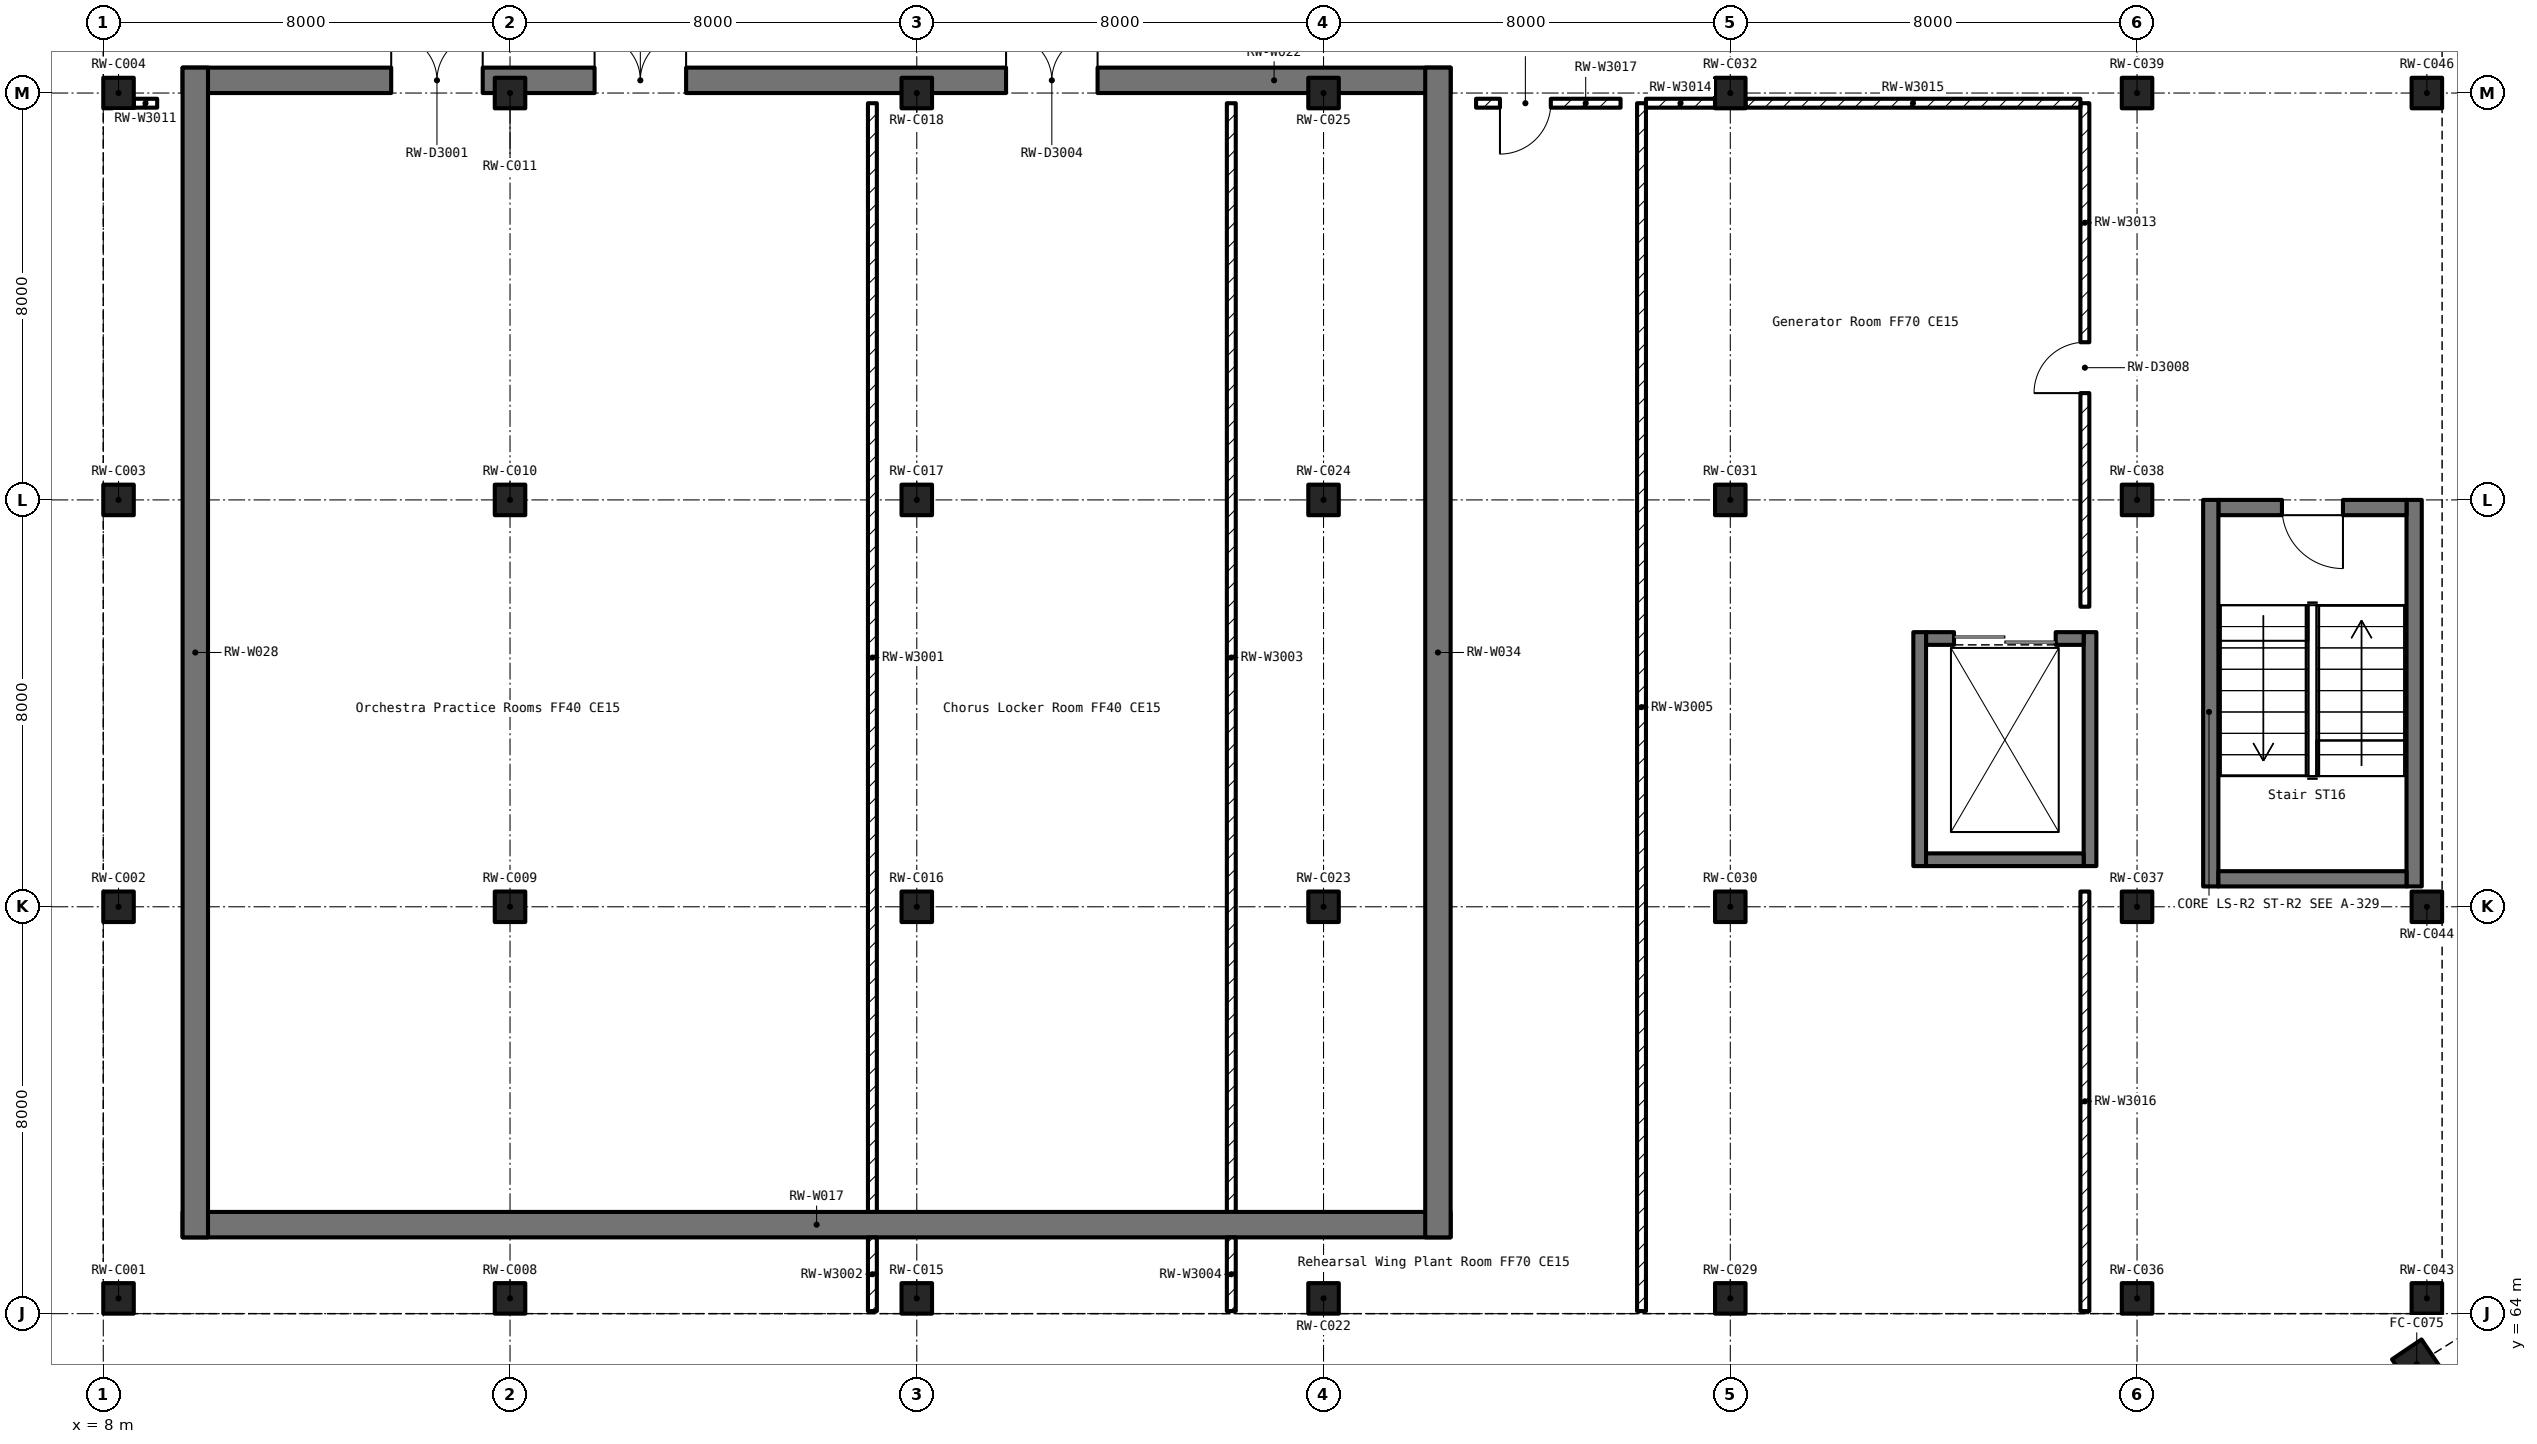
"""IFC4 building model, lengths in metres.
Left out: names, types, materials, properties, quantities, classifications, styles, units other than length and angle.
Written with IfcOpenShell. Run it as: python <this file> out.ifc"""

import sys

from ifc_helpers import new_model, si_unit, direction, frame, frame_2d, origin, origin_2d, place, context, subcontext, project, spatial, rectangle, extrude, element, fill, save


model = new_model("IFC4")
c1 = context("Model", 3, precision=1e-05, world=origin(), true_north=direction((0.0, 1.0)))
c2 = subcontext(c1, "Body", "Model", "MODEL_VIEW")
j1 = project(units=[si_unit("LENGTHUNIT", "METRE"), si_unit("PLANEANGLEUNIT", "RADIAN")], contexts=[c1])
p1 = place(None, origin())
s1 = spatial("IfcSite", under=j1, at=p1, CompositionType="ELEMENT")
p2 = place(p1, origin())
s2 = spatial("IfcBuilding", under=s1, at=p2, CompositionType="ELEMENT")
p3 = place(p2, frame((0.0, 0.0, -6.0)))
s3 = spatial("IfcBuildingStorey", under=s2, at=p3, CompositionType="ELEMENT", Elevation=-6.0)
p4 = place(p3, frame((53.501, 63.007, 0.0), z_axis=(0.0, 0.0, 1.0), x_axis=(0.829037572555, 0.559192903471, 0.0)))
e1 = element("IfcColumn", 1, at=p4, inside=s3, PredefinedType="COLUMN", context=c2, shape_type="SweptSolid", body=[
    extrude(rectangle(XDim=0.7, YDim=0.7, at=origin_2d()), origin(), (0.0, 0.0, 1.0), 6.0),
])
for number, where, z_axis, x_axis in (
    (2, (8.3, 64.3, 0.0), (0.0, 0.0, 1.0), (1.0, 0.0, 0.0)),
    (3, (8.3, 72.0, 0.0), (0.0, 0.0, 1.0), (1.0, 0.0, 0.0)),
    (4, (8.3, 80.0, 0.0), (0.0, 0.0, 1.0), (1.0, 0.0, 0.0)),
    (5, (8.3, 88.0, 0.0), (0.0, 0.0, 1.0), (1.0, 0.0, 0.0)),
    (6, (16.0, 64.3, 0.0), (0.0, 0.0, 1.0), (1.0, 0.0, 0.0)),
    (7, (16.0, 72.0, 0.0), (0.0, 0.0, 1.0), (1.0, 0.0, 0.0)),
    (8, (16.0, 80.0, 0.0), (0.0, 0.0, 1.0), (1.0, 0.0, 0.0)),
    (9, (16.0, 88.0, 0.0), (0.0, 0.0, 1.0), (1.0, 0.0, 0.0)),
    (10, (24.0, 64.3, 0.0), (0.0, 0.0, 1.0), (1.0, 0.0, 0.0)),
    (11, (24.0, 72.0, 0.0), (0.0, 0.0, 1.0), (1.0, 0.0, 0.0)),
    (12, (24.0, 80.0, 0.0), (0.0, 0.0, 1.0), (1.0, 0.0, 0.0)),
    (13, (24.0, 88.0, 0.0), (0.0, 0.0, 1.0), (1.0, 0.0, 0.0)),
    (14, (32.0, 64.3, 0.0), (0.0, 0.0, 1.0), (1.0, 0.0, 0.0)),
    (15, (32.0, 72.0, 0.0), (0.0, 0.0, 1.0), (1.0, 0.0, 0.0)),
    (16, (32.0, 80.0, 0.0), (0.0, 0.0, 1.0), (1.0, 0.0, 0.0)),
    (17, (32.0, 88.0, 0.0), (0.0, 0.0, 1.0), (1.0, 0.0, 0.0)),
    (18, (40.0, 64.3, 0.0), (0.0, 0.0, 1.0), (1.0, 0.0, 0.0)),
    (19, (40.0, 72.0, 0.0), (0.0, 0.0, 1.0), (1.0, 0.0, 0.0)),
    (20, (40.0, 80.0, 0.0), (0.0, 0.0, 1.0), (1.0, 0.0, 0.0)),
    (21, (40.0, 88.0, 0.0), (0.0, 0.0, 1.0), (1.0, 0.0, 0.0)),
    (22, (48.0, 64.3, 0.0), (0.0, 0.0, 1.0), (1.0, 0.0, 0.0)),
    (23, (48.0, 72.0, 0.0), (0.0, 0.0, 1.0), (1.0, 0.0, 0.0)),
    (24, (48.0, 80.0, 0.0), (0.0, 0.0, 1.0), (1.0, 0.0, 0.0)),
    (25, (48.0, 88.0, 0.0), (0.0, 0.0, 1.0), (1.0, 0.0, 0.0)),
    (26, (53.7, 64.3, 0.0), (0.0, 0.0, 1.0), (1.0, 0.0, 0.0)),
    (27, (53.7, 72.0, 0.0), (0.0, 0.0, 1.0), (1.0, 0.0, 0.0)),
    (28, (53.7, 88.0, 0.0), (0.0, 0.0, 1.0), (1.0, 0.0, 0.0)),
):
    element("IfcColumn", number, at=place(p3, frame(where, z_axis=z_axis, x_axis=x_axis)), inside=s3, PredefinedType="COLUMN", context=c2, shape_type="SweptSolid", body=[
        extrude(rectangle(XDim=0.6, YDim=0.6, at=origin_2d()), origin(), (0.0, 0.0, 1.0), 6.0),
    ])
p5 = place(p3, frame((9.56, 65.75, -0.3), z_axis=(0.0, 0.0, 1.0), x_axis=(1.0, 0.0, 0.0)))
e29 = element("IfcWall", 29, at=p5, inside=s3, PredefinedType="SHEAR", context=c2, shape_type="SweptSolid", body=[
    extrude(rectangle(XDim=24.94, YDim=0.5, at=frame_2d((12.47, 0.0))), origin(), (0.0, 0.0, 1.0), 6.3),
])
p6 = place(p3, frame((9.56, 88.25, -0.3), z_axis=(0.0, 0.0, 1.0), x_axis=(1.0, 0.0, 0.0)))
e30 = element("IfcWall", 30, at=p6, inside=s3, PredefinedType="SHEAR", context=c2, shape_type="SweptSolid", body=[
    extrude(rectangle(XDim=24.94, YDim=0.5, at=frame_2d((12.47, 0.0))), origin(), (0.0, 0.0, 1.0), 6.3),
])
p7 = place(p6, frame((4.103, 0.0, 0.3)))
e31 = element("IfcOpeningElement", 31, at=p7, cuts=e30, PredefinedType="OPENING", context=c2, shape_type="SweptSolid", body=[
    extrude(rectangle(XDim=1.8, YDim=2.1, at=frame_2d((0.9, 1.05))), frame((0.0, 0.262, 0.0), z_axis=(0.0, -1.0, 0.0), x_axis=(1.0, 0.0, 0.0)), (0.0, 0.0, 1.0), 0.524),
])
p8 = place(p6, frame((8.103, 0.0, 0.3)))
e32 = element("IfcOpeningElement", 32, at=p8, cuts=e30, PredefinedType="OPENING", context=c2, shape_type="SweptSolid", body=[
    extrude(rectangle(XDim=1.8, YDim=2.1, at=frame_2d((0.9, 1.05))), frame((0.0, 0.262, 0.0), z_axis=(0.0, -1.0, 0.0), x_axis=(1.0, 0.0, 0.0)), (0.0, 0.0, 1.0), 0.524),
])
p9 = place(p6, frame((16.196, 0.0, 0.3)))
e33 = element("IfcOpeningElement", 33, at=p9, cuts=e30, PredefinedType="OPENING", context=c2, shape_type="SweptSolid", body=[
    extrude(rectangle(XDim=1.8, YDim=2.1, at=frame_2d((0.9, 1.05))), frame((0.0, 0.262, 0.0), z_axis=(0.0, -1.0, 0.0), x_axis=(1.0, 0.0, 0.0)), (0.0, 0.0, 1.0), 0.524),
])
for number, where, z_axis, x_axis in (
    (34, (9.81, 65.5, -0.3), (0.0, 0.0, 1.0), (0.0, 1.0, 0.0)),
    (35, (34.25, 65.5, -0.3), (0.0, 0.0, 1.0), (0.0, 1.0, 0.0)),
):
    element("IfcWall", number, at=place(p3, frame(where, z_axis=z_axis, x_axis=x_axis)), inside=s3, PredefinedType="SHEAR", context=c2, shape_type="SweptSolid", body=[
        extrude(rectangle(XDim=23.0, YDim=0.5, at=frame_2d((11.5, 0.0))), origin(), (0.0, 0.0, 1.0), 6.3),
    ])
p10 = place(p3, frame((53.45, 72.4, 0.0), z_axis=(0.0, 0.0, 1.0), x_axis=(0.0, 1.0, 0.0)))
e36 = element("IfcWall", 36, at=p10, inside=s3, PredefinedType="SOLIDWALL", context=c2, shape_type="SweptSolid", body=[
    extrude(rectangle(XDim=7.6, YDim=0.3, at=frame_2d((3.8, 0.0))), origin(), (0.0, 0.0, 1.0), 6.0),
])
p11 = place(p3, frame((53.3, 79.85, 0.0), z_axis=(0.0, 0.0, 1.0), x_axis=(-1.0, 0.0, 0.0)))
e37 = element("IfcWall", 37, at=p11, inside=s3, PredefinedType="SOLIDWALL", context=c2, shape_type="SweptSolid", body=[
    extrude(rectangle(XDim=3.7, YDim=0.3, at=frame_2d((1.85, 0.0))), origin(), (0.0, 0.0, 1.0), 6.0),
])
p12 = place(p11, frame((1.25, 0.0, 0.0)))
e38 = element("IfcOpeningElement", 38, at=p12, cuts=e37, PredefinedType="OPENING", context=c2, shape_type="SweptSolid", body=[
    extrude(rectangle(XDim=1.2, YDim=2.1, at=frame_2d((0.6, 1.05))), frame((0.0, 0.162, 0.0), z_axis=(0.0, -1.0, 0.0), x_axis=(1.0, 0.0, 0.0)), (0.0, 0.0, 1.0), 0.324),
])
p13 = place(p3, frame((49.45, 80.0, 0.0), z_axis=(0.0, 0.0, 1.0), x_axis=(0.0, -1.0, 0.0)))
e39 = element("IfcWall", 39, at=p13, inside=s3, PredefinedType="SOLIDWALL", context=c2, shape_type="SweptSolid", body=[
    extrude(rectangle(XDim=7.6, YDim=0.3, at=frame_2d((3.8, 0.0))), origin(), (0.0, 0.0, 1.0), 6.0),
])
p14 = place(p3, frame((49.6, 72.55, 0.0), z_axis=(0.0, 0.0, 1.0), x_axis=(1.0, 0.0, 0.0)))
e40 = element("IfcWall", 40, at=p14, inside=s3, PredefinedType="SOLIDWALL", context=c2, shape_type="SweptSolid", body=[
    extrude(rectangle(XDim=3.7, YDim=0.3, at=frame_2d((1.85, 0.0))), origin(), (0.0, 0.0, 1.0), 6.0),
])
p15 = place(p3, frame((47.075, 72.8, 0.0), z_axis=(0.0, 0.0, 1.0), x_axis=(0.0, 1.0, 0.0)))
e41 = element("IfcWall", 41, at=p15, inside=s3, PredefinedType="SOLIDWALL", context=c2, shape_type="SweptSolid", body=[
    extrude(rectangle(XDim=4.6, YDim=0.25, at=frame_2d((2.3, 0.0))), origin(), (0.0, 0.0, 1.0), 6.0),
])
p16 = place(p3, frame((46.95, 77.275, 0.0), z_axis=(0.0, 0.0, 1.0), x_axis=(-1.0, 0.0, 0.0)))
e42 = element("IfcWall", 42, at=p16, inside=s3, PredefinedType="SOLIDWALL", context=c2, shape_type="SweptSolid", body=[
    extrude(rectangle(XDim=3.1, YDim=0.25, at=frame_2d((1.55, 0.0))), origin(), (0.0, 0.0, 1.0), 6.0),
])
p17 = place(p16, frame((0.55, 0.0, 0.0)))
e43 = element("IfcOpeningElement", 43, at=p17, cuts=e42, PredefinedType="OPENING", context=c2, shape_type="SweptSolid", body=[
    extrude(rectangle(XDim=2.0, YDim=2.2, at=frame_2d((1.0, 1.1))), frame((0.0, 0.137, 0.0), z_axis=(0.0, -1.0, 0.0), x_axis=(1.0, 0.0, 0.0)), (0.0, 0.0, 1.0), 0.274),
])
p18 = place(p3, frame((43.725, 77.4, 0.0), z_axis=(0.0, 0.0, 1.0), x_axis=(0.0, -1.0, 0.0)))
e44 = element("IfcWall", 44, at=p18, inside=s3, PredefinedType="SOLIDWALL", context=c2, shape_type="SweptSolid", body=[
    extrude(rectangle(XDim=4.6, YDim=0.25, at=frame_2d((2.3, 0.0))), origin(), (0.0, 0.0, 1.0), 6.0),
])
p19 = place(p3, frame((43.85, 72.925, 0.0), z_axis=(0.0, 0.0, 1.0), x_axis=(1.0, 0.0, 0.0)))
e45 = element("IfcWall", 45, at=p19, inside=s3, PredefinedType="SOLIDWALL", context=c2, shape_type="SweptSolid", body=[
    extrude(rectangle(XDim=3.1, YDim=0.25, at=frame_2d((1.55, 0.0))), origin(), (0.0, 0.0, 1.0), 6.0),
])
p20 = place(p3, frame((23.127, 87.8, 0.0), z_axis=(0.0, 0.0, 1.0), x_axis=(0.0, -1.0, 0.0)))
e46 = element("IfcWall", 46, at=p20, inside=s3, PredefinedType="PARTITIONING", context=c2, shape_type="SweptSolid", body=[
    extrude(rectangle(XDim=21.799, YDim=0.175, at=frame_2d((10.899, 0.0))), origin(), (0.0, 0.0, 1.0), 4.95),
])
p21 = place(p3, frame((23.127, 65.499, 0.0), z_axis=(0.0, 0.0, 1.0), x_axis=(0.0, -1.0, 0.0)))
e47 = element("IfcWall", 47, at=p21, inside=s3, PredefinedType="PARTITIONING", context=c2, shape_type="SweptSolid", body=[
    extrude(rectangle(XDim=1.449, YDim=0.175, at=frame_2d((0.725, 0.0))), origin(), (0.0, 0.0, 1.0), 4.95),
])
p22 = place(p3, frame((30.186, 87.8, 0.0), z_axis=(0.0, 0.0, 1.0), x_axis=(0.0, -1.0, 0.0)))
e48 = element("IfcWall", 48, at=p22, inside=s3, PredefinedType="PARTITIONING", context=c2, shape_type="SweptSolid", body=[
    extrude(rectangle(XDim=21.799, YDim=0.175, at=frame_2d((10.899, 0.0))), origin(), (0.0, 0.0, 1.0), 4.95),
])
p23 = place(p3, frame((30.186, 65.499, 0.0), z_axis=(0.0, 0.0, 1.0), x_axis=(0.0, -1.0, 0.0)))
e49 = element("IfcWall", 49, at=p23, inside=s3, PredefinedType="PARTITIONING", context=c2, shape_type="SweptSolid", body=[
    extrude(rectangle(XDim=1.449, YDim=0.175, at=frame_2d((0.725, 0.0))), origin(), (0.0, 0.0, 1.0), 4.95),
])
p24 = place(p3, frame((38.254, 64.05, 0.0), z_axis=(0.0, 0.0, 1.0), x_axis=(0.0, 1.0, 0.0)))
e50 = element("IfcWall", 50, at=p24, inside=s3, PredefinedType="PARTITIONING", context=c2, shape_type="SweptSolid", body=[
    extrude(rectangle(XDim=23.75, YDim=0.175, at=frame_2d((11.875, 0.0))), origin(), (0.0, 0.0, 1.0), 4.95),
])
p25 = place(p3, frame((8.601, 87.8, 0.0), z_axis=(0.0, 0.0, 1.0), x_axis=(1.0, 0.0, 0.0)))
e51 = element("IfcWall", 51, at=p25, inside=s3, PredefinedType="PARTITIONING", context=c2, shape_type="SweptSolid", body=[
    extrude(rectangle(XDim=0.459, YDim=0.175, at=frame_2d((0.229, 0.0))), origin(), (0.0, 0.0, 1.0), 4.95),
])
p26 = place(p3, frame((46.974, 77.9, 0.0), z_axis=(0.0, 0.0, 1.0), x_axis=(0.0, 1.0, 0.0)))
e52 = element("IfcWall", 52, at=p26, inside=s3, PredefinedType="PARTITIONING", context=c2, shape_type="SweptSolid", body=[
    extrude(rectangle(XDim=9.9, YDim=0.175, at=frame_2d((4.95, 0.0))), origin(), (0.0, 0.0, 1.0), 4.95),
])
p27 = place(p26, frame((4.2, 0.0, 0.0)))
e53 = element("IfcOpeningElement", 53, at=p27, cuts=e52, PredefinedType="OPENING", context=c2, shape_type="SweptSolid", body=[
    extrude(rectangle(XDim=1.0, YDim=2.1, at=frame_2d((0.5, 1.05))), frame((0.0, 0.1, 0.0), z_axis=(0.0, -1.0, 0.0), x_axis=(1.0, 0.0, 0.0)), (0.0, 0.0, 1.0), 0.199),
])
p28 = place(p3, frame((39.7, 87.8, 0.0), z_axis=(0.0, 0.0, 1.0), x_axis=(-1.0, 0.0, 0.0)))
e54 = element("IfcWall", 54, at=p28, inside=s3, PredefinedType="PARTITIONING", context=c2, shape_type="SweptSolid", body=[
    extrude(rectangle(XDim=1.358, YDim=0.175, at=frame_2d((0.679, 0.0))), origin(), (0.0, 0.0, 1.0), 4.95),
])
p29 = place(p3, frame((46.886, 87.8, 0.0), z_axis=(0.0, 0.0, 1.0), x_axis=(-1.0, 0.0, 0.0)))
e55 = element("IfcWall", 55, at=p29, inside=s3, PredefinedType="PARTITIONING", context=c2, shape_type="SweptSolid", body=[
    extrude(rectangle(XDim=6.586, YDim=0.175, at=frame_2d((3.293, 0.0))), origin(), (0.0, 0.0, 1.0), 4.95),
])
p30 = place(p3, frame((46.974, 64.05, 0.0), z_axis=(0.0, 0.0, 1.0), x_axis=(0.0, 1.0, 0.0)))
e56 = element("IfcWall", 56, at=p30, inside=s3, PredefinedType="PARTITIONING", context=c2, shape_type="SweptSolid", body=[
    extrude(rectangle(XDim=8.25, YDim=0.175, at=frame_2d((4.125, 0.0))), origin(), (0.0, 0.0, 1.0), 4.95),
])
p31 = place(p3, frame((37.842, 87.8, 0.0), z_axis=(0.0, 0.0, 1.0), x_axis=(-1.0, 0.0, 0.0)))
e57 = element("IfcWall", 57, at=p31, inside=s3, PredefinedType="PARTITIONING", context=c2, shape_type="SweptSolid", body=[
    extrude(rectangle(XDim=2.842, YDim=0.175, at=frame_2d((1.421, 0.0))), origin(), (0.0, 0.0, 1.0), 4.95),
])
p32 = place(p31, frame((1.372, 0.0, 0.0)))
e58 = element("IfcOpeningElement", 58, at=p32, cuts=e57, PredefinedType="OPENING", context=c2, shape_type="SweptSolid", body=[
    extrude(rectangle(XDim=1.0, YDim=2.1, at=frame_2d((0.5, 1.05))), frame((0.0, 0.1, 0.0), z_axis=(0.0, -1.0, 0.0), x_axis=(1.0, 0.0, 0.0)), (0.0, 0.0, 1.0), 0.199),
])
p33 = place(p12, origin())
e59 = element("IfcDoor", 59, at=p33, inside=s3, OperationType="SINGLE_SWING_LEFT", PredefinedType="DOOR", context=c2, shape_type="SweptSolid", body=[
    extrude(rectangle(XDim=1.2, YDim=2.1, at=frame_2d((0.6, 1.05))), frame((0.0, 0.025, 0.0), z_axis=(0.0, -1.0, 0.0), x_axis=(1.0, 0.0, 0.0)), (0.0, 0.0, 1.0), 0.05),
])
fill(e38, e59)
p34 = place(p17, origin())
e60 = element("IfcDoor", 60, at=p34, inside=s3, OperationType="DOUBLE_DOOR_SLIDING", PredefinedType="DOOR", context=c2, shape_type="SweptSolid", body=[
    extrude(rectangle(XDim=2.0, YDim=2.2, at=frame_2d((1.0, 1.1))), frame((0.0, 0.025, 0.0), z_axis=(0.0, -1.0, 0.0), x_axis=(1.0, 0.0, 0.0)), (0.0, 0.0, 1.0), 0.05),
])
fill(e43, e60)
p35 = place(p7, origin())
e61 = element("IfcDoor", 61, at=p35, inside=s3, OperationType="DOUBLE_DOOR_SINGLE_SWING", PredefinedType="DOOR", context=c2, shape_type="SweptSolid", body=[
    extrude(rectangle(XDim=1.8, YDim=2.1, at=frame_2d((0.9, 1.05))), frame((0.0, 0.025, 0.0), z_axis=(0.0, -1.0, 0.0), x_axis=(1.0, 0.0, 0.0)), (0.0, 0.0, 1.0), 0.05),
])
fill(e31, e61)
p36 = place(p8, origin())
e62 = element("IfcDoor", 62, at=p36, inside=s3, OperationType="DOUBLE_DOOR_SINGLE_SWING", PredefinedType="DOOR", context=c2, shape_type="SweptSolid", body=[
    extrude(rectangle(XDim=1.8, YDim=2.1, at=frame_2d((0.9, 1.05))), frame((0.0, 0.025, 0.0), z_axis=(0.0, -1.0, 0.0), x_axis=(1.0, 0.0, 0.0)), (0.0, 0.0, 1.0), 0.05),
])
fill(e32, e62)
p37 = place(p9, origin())
e63 = element("IfcDoor", 63, at=p37, inside=s3, OperationType="DOUBLE_DOOR_SINGLE_SWING", PredefinedType="DOOR", context=c2, shape_type="SweptSolid", body=[
    extrude(rectangle(XDim=1.8, YDim=2.1, at=frame_2d((0.9, 1.05))), frame((0.0, 0.025, 0.0), z_axis=(0.0, -1.0, 0.0), x_axis=(1.0, 0.0, 0.0)), (0.0, 0.0, 1.0), 0.05),
])
fill(e33, e63)
p38 = place(p32, origin())
e64 = element("IfcDoor", 64, at=p38, inside=s3, OperationType="SINGLE_SWING_RIGHT", PredefinedType="DOOR", context=c2, shape_type="SweptSolid", body=[
    extrude(rectangle(XDim=1.0, YDim=2.1, at=frame_2d((0.5, 1.05))), frame((0.0, 0.025, 0.0), z_axis=(0.0, -1.0, 0.0), x_axis=(1.0, 0.0, 0.0)), (0.0, 0.0, 1.0), 0.05),
])
fill(e58, e64)
p39 = place(p27, origin())
e65 = element("IfcDoor", 65, at=p39, inside=s3, OperationType="SINGLE_SWING_LEFT", PredefinedType="DOOR", context=c2, shape_type="SweptSolid", body=[
    extrude(rectangle(XDim=1.0, YDim=2.1, at=frame_2d((0.5, 1.05))), frame((0.0, 0.025, 0.0), z_axis=(0.0, -1.0, 0.0), x_axis=(1.0, 0.0, 0.0)), (0.0, 0.0, 1.0), 0.05),
])
fill(e53, e65)
save(model, sys.argv[1])
